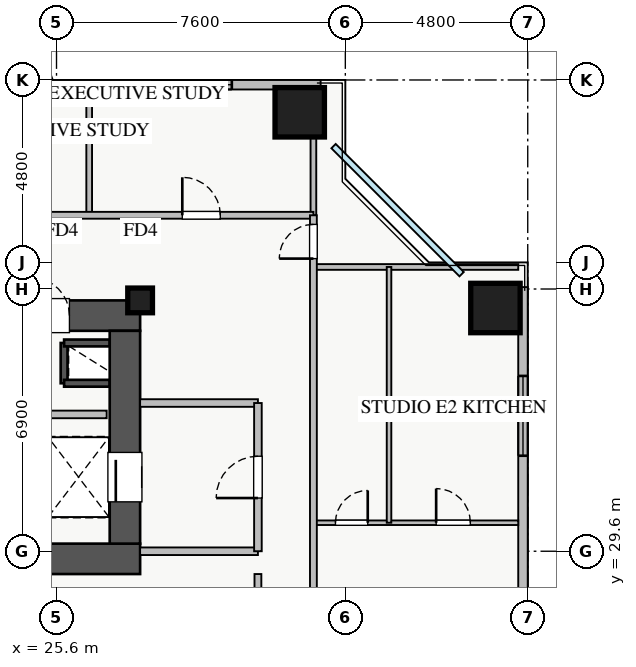
"""IFC4 building model, lengths in metres.
Left out: names, types, materials, properties, quantities, classifications, styles, units other than length and angle.
Written with IfcOpenShell. Run it as: python <this file> out.ifc"""

import sys

from ifc_helpers import new_model, si_unit, direction, frame, frame_2d, origin, origin_2d, place, context, subcontext, project, spatial, rectangle, extrude, source, transform, mapped, element, fill, save


model = new_model("IFC4")
c1 = context("Model", 3, precision=1e-05, world=origin(), true_north=direction((0.0, 1.0)))
c2 = subcontext(c1, "Body", "Model", "MODEL_VIEW")
j1 = project(units=[si_unit("LENGTHUNIT", "METRE"), si_unit("PLANEANGLEUNIT", "RADIAN")], contexts=[c1])
p1 = place(None, origin())
s1 = spatial("IfcSite", under=j1, at=p1, CompositionType="ELEMENT")
p2 = place(p1, origin())
s2 = spatial("IfcBuilding", under=s1, at=p2, CompositionType="ELEMENT")
p3 = place(p2, frame((0.0, 0.0, 66.5)))
s3 = spatial("IfcBuildingStorey", under=s2, at=p3, CompositionType="ELEMENT", Elevation=66.5)
p4 = place(p3, frame((25.8, 34.02, 0.0), z_axis=(0.0, 0.0, 1.0), x_axis=(0.0, 1.0, 0.0)))
e1 = element("IfcWall", 1, at=p4, inside=s3, PredefinedType="SHEAR", context=c2, shape_type="SweptSolid", body=[
    extrude(rectangle(XDim=1.06, YDim=0.18, at=frame_2d((0.53, 0.0))), origin(), (0.0, 0.0, 1.0), 3.07),
])
for number, where, z_axis, x_axis in (
    (2, (25.8, 35.08, 0.0), (0.0, 0.0, 1.0), (1.0, 0.0, 0.0)),
    (3, (25.8, 34.02, 0.0), (0.0, 0.0, 1.0), (1.0, 0.0, 0.0)),
):
    element("IfcWall", number, at=place(p3, frame(where, z_axis=z_axis, x_axis=x_axis)), inside=s3, PredefinedType="SHEAR", context=c2, shape_type="SweptSolid", body=[
        extrude(rectangle(XDim=1.2, YDim=0.18, at=frame_2d((0.6, 0.0))), origin(), (0.0, 0.0, 1.0), 3.07),
    ])
p5 = place(p3, frame((10.2, 29.4, 0.0), z_axis=(0.0, 0.0, 1.0), x_axis=(1.0, 0.0, 0.0)))
e4 = element("IfcWall", 4, at=p5, inside=s3, PredefinedType="SHEAR", context=c2, shape_type="SweptSolid", body=[
    extrude(rectangle(XDim=17.6, YDim=0.8, at=frame_2d((8.8, 0.0))), origin(), (0.0, 0.0, 1.0), 3.25),
])
p6 = place(p3, frame((10.2, 35.8, 0.0), z_axis=(0.0, 0.0, 1.0), x_axis=(1.0, 0.0, 0.0)))
e5 = element("IfcWall", 5, at=p6, inside=s3, PredefinedType="SHEAR", context=c2, shape_type="SweptSolid", body=[
    extrude(rectangle(XDim=17.6, YDim=0.8, at=frame_2d((8.8, 0.0))), origin(), (0.0, 0.0, 1.0), 3.25),
])
p7 = place(p6, frame((1.15, 0.0, 0.0)))
e6 = element("IfcOpeningElement", 6, at=p7, cuts=e5, PredefinedType="OPENING", context=c2, shape_type="SweptSolid", body=[
    extrude(rectangle(XDim=1.1, YDim=2.05, at=frame_2d((0.55, 1.025))), frame((0.0, 0.41, 0.0), z_axis=(0.0, -1.0, 0.0), x_axis=(1.0, 0.0, 0.0)), (0.0, 0.0, 1.0), 0.82),
])
p8 = place(p6, frame((8.3, 0.0, 0.0)))
e7 = element("IfcOpeningElement", 7, at=p8, cuts=e5, PredefinedType="OPENING", context=c2, shape_type="SweptSolid", body=[
    extrude(rectangle(XDim=1.1, YDim=2.05, at=frame_2d((0.55, 1.025))), frame((0.0, 0.41, 0.0), z_axis=(0.0, -1.0, 0.0), x_axis=(1.0, 0.0, 0.0)), (0.0, 0.0, 1.0), 0.82),
])
p9 = place(p6, frame((10.05, 0.0, 0.0)))
e8 = element("IfcOpeningElement", 8, at=p9, cuts=e5, PredefinedType="OPENING", context=c2, shape_type="SweptSolid", body=[
    extrude(rectangle(XDim=1.1, YDim=2.05, at=frame_2d((0.55, 1.025))), frame((0.0, 0.41, 0.0), z_axis=(0.0, -1.0, 0.0), x_axis=(1.0, 0.0, 0.0)), (0.0, 0.0, 1.0), 0.82),
])
p10 = place(p6, frame((14.74, 0.0, 0.0)))
e9 = element("IfcOpeningElement", 9, at=p10, cuts=e5, PredefinedType="OPENING", context=c2, shape_type="SweptSolid", body=[
    extrude(rectangle(XDim=1.0, YDim=2.05, at=frame_2d((0.5, 1.025))), frame((0.0, 0.41, 0.0), z_axis=(0.0, -1.0, 0.0), x_axis=(1.0, 0.0, 0.0)), (0.0, 0.0, 1.0), 0.82),
])
p11 = place(p6, frame((12.585, 0.0, 0.0)))
e10 = element("IfcOpeningElement", 10, at=p11, cuts=e5, PredefinedType="OPENING", context=c2, shape_type="SweptSolid", body=[
    extrude(rectangle(XDim=1.0, YDim=2.05, at=frame_2d((0.5, 1.025))), frame((0.0, 0.41, 0.0), z_axis=(0.0, -1.0, 0.0), x_axis=(1.0, 0.0, 0.0)), (0.0, 0.0, 1.0), 0.82),
])
p12 = place(p3, frame((27.4, 29.8, 0.0), z_axis=(0.0, 0.0, 1.0), x_axis=(0.0, 1.0, 0.0)))
e11 = element("IfcWall", 11, at=p12, inside=s3, PredefinedType="SHEAR", context=c2, shape_type="SweptSolid", body=[
    extrude(rectangle(XDim=5.6, YDim=0.8, at=frame_2d((2.8, 0.0))), origin(), (0.0, 0.0, 1.0), 3.25),
])
p13 = place(p12, frame((1.1, 0.0, 0.0)))
e12 = element("IfcOpeningElement", 12, at=p13, cuts=e11, PredefinedType="OPENING", context=c2, shape_type="SweptSolid", body=[
    extrude(rectangle(XDim=1.3, YDim=2.05, at=frame_2d((0.65, 1.025))), frame((0.0, 0.41, 0.0), z_axis=(0.0, -1.0, 0.0), x_axis=(1.0, 0.0, 0.0)), (0.0, 0.0, 1.0), 0.82),
])
m1 = source(origin(), c2, "Body", "SweptSolid", [
    extrude(rectangle(XDim=0.65, YDim=0.65, at=origin_2d()), origin(), (0.0, 0.0, 1.0), 3.25),
])
p14 = place(p3, frame((27.8, 36.2, 0.0), z_axis=(0.0, 0.0, 1.0), x_axis=(1.0, 0.0, 0.0)))
e13 = element("IfcColumn", 13, at=p14, inside=s3, PredefinedType="PILASTER", context=c2, shape_type="MappedRepresentation", body=[
    mapped(m1, transform((0.0, 0.0, 0.0), x_axis=(1.0, 0.0, 0.0), y_axis=(0.0, 1.0, 0.0), z_axis=(0.0, 0.0, 1.0), scale=1.0)),
])
m2 = source(origin(), c2, "Body", "SweptSolid", [
    extrude(rectangle(XDim=1.3, YDim=1.3, at=origin_2d()), origin(), (0.0, 0.0, 1.0), 3.25),
])
for number, where, z_axis, x_axis in (
    (14, (37.15, 36.0, 0.0), (0.0, 0.0, 1.0), (1.0, 0.0, 0.0)),
    (15, (32.0, 41.15, 0.0), (0.0, 0.0, 1.0), (1.0, 0.0, 0.0)),
):
    element("IfcColumn", number, at=place(p3, frame(where, z_axis=z_axis, x_axis=x_axis)), inside=s3, PredefinedType="COLUMN", context=c2, shape_type="MappedRepresentation", body=[
        mapped(m2, transform((0.0, 0.0, 0.0), x_axis=(1.0, 0.0, 0.0), y_axis=(0.0, 1.0, 0.0), z_axis=(0.0, 0.0, 1.0), scale=1.0)),
    ])
p15 = place(p3, frame((5.45, 41.875, 0.0), z_axis=(0.0, 0.0, 1.0), x_axis=(1.0, 0.0, 0.0)))
e16 = element("IfcWall", 16, at=p15, inside=s3, PredefinedType="STANDARD", context=c2, shape_type="SweptSolid", body=[
    extrude(rectangle(XDim=27.1, YDim=0.25, at=frame_2d((13.55, 0.0))), origin(), (0.0, 0.0, 1.0), 2.61),
])
p16 = place(p15, frame((14.4, 0.0, 0.0)))
e17 = element("IfcOpeningElement", 17, at=p16, cuts=e16, PredefinedType="OPENING", context=c2, shape_type="SweptSolid", body=[
    extrude(rectangle(XDim=1.2, YDim=2.1, at=frame_2d((0.6, 1.05))), frame((0.0, 0.135, 0.0), z_axis=(0.0, -1.0, 0.0), x_axis=(1.0, 0.0, 0.0)), (0.0, 0.0, 1.0), 0.27),
])
p17 = place(p15, frame((1.465, 0.0, 0.9)))
e18 = element("IfcOpeningElement", 18, at=p17, cuts=e16, PredefinedType="OPENING", context=c2, shape_type="SweptSolid", body=[
    extrude(rectangle(XDim=1.5, YDim=1.5, at=frame_2d((0.75, 0.75))), frame((0.0, 0.135, 0.0), z_axis=(0.0, -1.0, 0.0), x_axis=(1.0, 0.0, 0.0)), (0.0, 0.0, 1.0), 0.27),
])
p18 = place(p15, frame((9.263, 0.0, 0.9)))
e19 = element("IfcOpeningElement", 19, at=p18, cuts=e16, PredefinedType="OPENING", context=c2, shape_type="SweptSolid", body=[
    extrude(rectangle(XDim=1.8, YDim=1.45, at=frame_2d((0.9, 0.725))), frame((0.0, 0.135, 0.0), z_axis=(0.0, -1.0, 0.0), x_axis=(1.0, 0.0, 0.0)), (0.0, 0.0, 1.0), 0.27),
])
p19 = place(p15, frame((17.93, 0.0, 0.9)))
e20 = element("IfcOpeningElement", 20, at=p19, cuts=e16, PredefinedType="OPENING", context=c2, shape_type="SweptSolid", body=[
    extrude(rectangle(XDim=1.5, YDim=1.5, at=frame_2d((0.75, 0.75))), frame((0.0, 0.135, 0.0), z_axis=(0.0, -1.0, 0.0), x_axis=(1.0, 0.0, 0.0)), (0.0, 0.0, 1.0), 0.27),
])
p20 = place(p15, frame((22.663, 0.0, 0.9)))
e21 = element("IfcOpeningElement", 21, at=p20, cuts=e16, PredefinedType="OPENING", context=c2, shape_type="SweptSolid", body=[
    extrude(rectangle(XDim=2.1, YDim=1.48, at=frame_2d((1.05, 0.74))), frame((0.0, 0.135, 0.0), z_axis=(0.0, -1.0, 0.0), x_axis=(1.0, 0.0, 0.0)), (0.0, 0.0, 1.0), 0.27),
])
p21 = place(p15, frame((4.63, 0.0, 0.9)))
e22 = element("IfcOpeningElement", 22, at=p21, cuts=e16, PredefinedType="OPENING", context=c2, shape_type="SweptSolid", body=[
    extrude(rectangle(XDim=2.4, YDim=1.5, at=frame_2d((1.2, 0.75))), frame((0.0, 0.135, 0.0), z_axis=(0.0, -1.0, 0.0), x_axis=(1.0, 0.0, 0.0)), (0.0, 0.0, 1.0), 0.27),
])
p22 = place(p3, frame((37.875, 9.45, 0.0), z_axis=(0.0, 0.0, 1.0), x_axis=(0.0, 1.0, 0.0)))
e23 = element("IfcWall", 23, at=p22, inside=s3, PredefinedType="STANDARD", context=c2, shape_type="SweptSolid", body=[
    extrude(rectangle(XDim=27.1, YDim=0.25, at=frame_2d((13.55, 0.0))), origin(), (0.0, 0.0, 1.0), 2.61),
])
p23 = place(p22, frame((14.4, 0.0, 0.0)))
e24 = element("IfcOpeningElement", 24, at=p23, cuts=e23, PredefinedType="OPENING", context=c2, shape_type="SweptSolid", body=[
    extrude(rectangle(XDim=1.2, YDim=2.1, at=frame_2d((0.6, 1.05))), frame((0.0, 0.135, 0.0), z_axis=(0.0, -1.0, 0.0), x_axis=(1.0, 0.0, 0.0)), (0.0, 0.0, 1.0), 0.27),
])
p24 = place(p22, frame((2.188, 0.0, 0.9)))
e25 = element("IfcOpeningElement", 25, at=p24, cuts=e23, PredefinedType="OPENING", context=c2, shape_type="SweptSolid", body=[
    extrude(rectangle(XDim=2.4, YDim=1.48, at=frame_2d((1.2, 0.74))), frame((0.0, 0.135, 0.0), z_axis=(0.0, -1.0, 0.0), x_axis=(1.0, 0.0, 0.0)), (0.0, 0.0, 1.0), 0.27),
])
p25 = place(p22, frame((22.663, 0.0, 0.9)))
e26 = element("IfcOpeningElement", 26, at=p25, cuts=e23, PredefinedType="OPENING", context=c2, shape_type="SweptSolid", body=[
    extrude(rectangle(XDim=2.1, YDim=1.48, at=frame_2d((1.05, 0.74))), frame((0.0, 0.135, 0.0), z_axis=(0.0, -1.0, 0.0), x_axis=(1.0, 0.0, 0.0)), (0.0, 0.0, 1.0), 0.27),
])
p26 = place(p22, frame((13.235, 0.0, 0.9)))
e27 = element("IfcOpeningElement", 27, at=p26, cuts=e23, PredefinedType="OPENING", context=c2, shape_type="SweptSolid", body=[
    extrude(rectangle(XDim=0.9, YDim=1.2, at=frame_2d((0.45, 0.6))), frame((0.0, 0.135, 0.0), z_axis=(0.0, -1.0, 0.0), x_axis=(1.0, 0.0, 0.0)), (0.0, 0.0, 1.0), 0.27),
])
for number, where, z_axis, x_axis in (
    (28, (27.8, 29.6, 0.0), (0.0, 0.0, 1.0), (1.0, 0.0, 0.0)),
    (29, (27.8, 33.5, 0.0), (0.0, 0.0, 1.0), (1.0, 0.0, 0.0)),
):
    element("IfcWall", number, at=place(p3, frame(where, z_axis=z_axis, x_axis=x_axis)), inside=s3, PredefinedType="PARTITIONING", context=c2, shape_type="SweptSolid", body=[
        extrude(rectangle(XDim=3.1, YDim=0.2, at=frame_2d((1.55, 0.0))), origin(), (0.0, 0.0, 1.0), 3.07),
    ])
p27 = place(p3, frame((30.9, 29.6, 0.0), z_axis=(0.0, 0.0, 1.0), x_axis=(0.0, 1.0, 0.0)))
e30 = element("IfcWall", 30, at=p27, inside=s3, PredefinedType="PARTITIONING", context=c2, shape_type="SweptSolid", body=[
    extrude(rectangle(XDim=3.9, YDim=0.2, at=frame_2d((1.95, 0.0))), origin(), (0.0, 0.0, 1.0), 3.07),
])
p28 = place(p27, frame((1.4, 0.0, 0.0)))
e31 = element("IfcOpeningElement", 31, at=p28, cuts=e30, PredefinedType="OPENING", context=c2, shape_type="SweptSolid", body=[
    extrude(rectangle(XDim=1.1, YDim=2.05, at=frame_2d((0.55, 1.025))), frame((0.0, 0.11, 0.0), z_axis=(0.0, -1.0, 0.0), x_axis=(1.0, 0.0, 0.0)), (0.0, 0.0, 1.0), 0.22),
])
p29 = place(p3, frame((21.75, 33.2, 0.0), z_axis=(0.0, 0.0, 1.0), x_axis=(1.0, 0.0, 0.0)))
e32 = element("IfcWall", 32, at=p29, inside=s3, PredefinedType="PARTITIONING", context=c2, shape_type="SweptSolid", body=[
    extrude(rectangle(XDim=5.17, YDim=0.2, at=frame_2d((2.585, 0.0))), origin(), (0.0, 0.0, 1.0), 3.07),
])
for number, where, z_axis, x_axis in (
    (33, (26.46, 38.44, 0.0), (0.0, 0.0, 1.0), (0.0, 1.0, 0.0)),
    (34, (32.36, 38.44, 0.0), (0.0, 0.0, 1.0), (0.0, 1.0, 0.0)),
):
    element("IfcWall", number, at=place(p3, frame(where, z_axis=z_axis, x_axis=x_axis)), inside=s3, PredefinedType="PARTITIONING", context=c2, shape_type="SweptSolid", body=[
        extrude(rectangle(XDim=3.31, YDim=0.15, at=frame_2d((1.655, 0.0))), origin(), (0.0, 0.0, 1.0), 3.07),
    ])
p30 = place(p3, frame((8.75, 38.44, 0.0), z_axis=(0.0, 0.0, 1.0), x_axis=(1.0, 0.0, 0.0)))
e35 = element("IfcWall", 35, at=p30, inside=s3, PredefinedType="PARTITIONING", context=c2, shape_type="SweptSolid", body=[
    extrude(rectangle(XDim=23.61, YDim=0.18, at=frame_2d((11.805, 0.0))), origin(), (0.0, 0.0, 1.0), 3.07),
])
p31 = place(p30, frame((2.03, 0.0, 0.0)))
e36 = element("IfcOpeningElement", 36, at=p31, cuts=e35, PredefinedType="OPENING", context=c2, shape_type="SweptSolid", body=[
    extrude(rectangle(XDim=1.0, YDim=2.05, at=frame_2d((0.5, 1.025))), frame((0.0, 0.1, 0.0), z_axis=(0.0, -1.0, 0.0), x_axis=(1.0, 0.0, 0.0)), (0.0, 0.0, 1.0), 0.2),
])
p32 = place(p30, frame((8.555, 0.0, 0.0)))
e37 = element("IfcOpeningElement", 37, at=p32, cuts=e35, PredefinedType="OPENING", context=c2, shape_type="SweptSolid", body=[
    extrude(rectangle(XDim=1.0, YDim=2.05, at=frame_2d((0.5, 1.025))), frame((0.0, 0.1, 0.0), z_axis=(0.0, -1.0, 0.0), x_axis=(1.0, 0.0, 0.0)), (0.0, 0.0, 1.0), 0.2),
])
p33 = place(p30, frame((14.88, 0.0, 0.0)))
e38 = element("IfcOpeningElement", 38, at=p33, cuts=e35, PredefinedType="OPENING", context=c2, shape_type="SweptSolid", body=[
    extrude(rectangle(XDim=1.0, YDim=2.05, at=frame_2d((0.5, 1.025))), frame((0.0, 0.1, 0.0), z_axis=(0.0, -1.0, 0.0), x_axis=(1.0, 0.0, 0.0)), (0.0, 0.0, 1.0), 0.2),
])
p34 = place(p30, frame((20.16, 0.0, 0.0)))
e39 = element("IfcOpeningElement", 39, at=p34, cuts=e35, PredefinedType="OPENING", context=c2, shape_type="SweptSolid", body=[
    extrude(rectangle(XDim=1.0, YDim=2.05, at=frame_2d((0.5, 1.025))), frame((0.0, 0.1, 0.0), z_axis=(0.0, -1.0, 0.0), x_axis=(1.0, 0.0, 0.0)), (0.0, 0.0, 1.0), 0.2),
])
p35 = place(p3, frame((32.36, 37.08, 0.0), z_axis=(0.0, 0.0, 1.0), x_axis=(1.0, 0.0, 0.0)))
e40 = element("IfcWall", 40, at=p35, inside=s3, PredefinedType="PARTITIONING", context=c2, shape_type="SweptSolid", body=[
    extrude(rectangle(XDim=5.39, YDim=0.15, at=frame_2d((2.695, 0.0))), origin(), (0.0, 0.0, 1.0), 3.07),
])
p36 = place(p3, frame((32.36, 30.35, 0.0), z_axis=(0.0, 0.0, 1.0), x_axis=(1.0, 0.0, 0.0)))
e41 = element("IfcWall", 41, at=p36, inside=s3, PredefinedType="PLUMBINGWALL", context=c2, shape_type="SweptSolid", body=[
    extrude(rectangle(XDim=5.39, YDim=0.12, at=frame_2d((2.695, 0.0))), origin(), (0.0, 0.0, 1.0), 3.07),
])
p37 = place(p36, frame((0.58, 0.0, 0.0)))
e42 = element("IfcOpeningElement", 42, at=p37, cuts=e41, PredefinedType="OPENING", context=c2, shape_type="SweptSolid", body=[
    extrude(rectangle(XDim=0.85, YDim=2.05, at=frame_2d((0.425, 1.025))), frame((0.0, 0.07, 0.0), z_axis=(0.0, -1.0, 0.0), x_axis=(1.0, 0.0, 0.0)), (0.0, 0.0, 1.0), 0.14),
])
p38 = place(p36, frame((3.23, 0.0, 0.0)))
e43 = element("IfcOpeningElement", 43, at=p38, cuts=e41, PredefinedType="OPENING", context=c2, shape_type="SweptSolid", body=[
    extrude(rectangle(XDim=0.9, YDim=2.05, at=frame_2d((0.45, 1.025))), frame((0.0, 0.07, 0.0), z_axis=(0.0, -1.0, 0.0), x_axis=(1.0, 0.0, 0.0)), (0.0, 0.0, 1.0), 0.14),
])
p39 = place(p3, frame((34.35, 30.35, 0.0), z_axis=(0.0, 0.0, 1.0), x_axis=(0.0, 1.0, 0.0)))
e44 = element("IfcWall", 44, at=p39, inside=s3, PredefinedType="PLUMBINGWALL", context=c2, shape_type="SweptSolid", body=[
    extrude(rectangle(XDim=6.73, YDim=0.12, at=frame_2d((3.365, 0.0))), origin(), (0.0, 0.0, 1.0), 3.07),
])
p40 = place(p3, frame((32.36, 7.21, 0.0), z_axis=(0.0, 0.0, 1.0), x_axis=(0.0, 1.0, 0.0)))
e45 = element("IfcWall", 45, at=p40, inside=s3, PredefinedType="PARTITIONING", context=c2, shape_type="SweptSolid", body=[
    extrude(rectangle(XDim=31.23, YDim=0.18, at=frame_2d((15.615, 0.0))), origin(), (0.0, 0.0, 1.0), 2.715),
])
p41 = place(p40, frame((30.09, 0.0, 0.0)))
e46 = element("IfcOpeningElement", 46, at=p41, cuts=e45, PredefinedType="OPENING", context=c2, shape_type="SweptSolid", body=[
    extrude(rectangle(XDim=0.9, YDim=2.05, at=frame_2d((0.45, 1.025))), frame((0.0, 0.1, 0.0), z_axis=(0.0, -1.0, 0.0), x_axis=(1.0, 0.0, 0.0)), (0.0, 0.0, 1.0), 0.2),
])
p42 = place(p40, frame((0.415, 0.0, 0.0)))
e47 = element("IfcOpeningElement", 47, at=p42, cuts=e45, PredefinedType="OPENING", context=c2, shape_type="SweptSolid", body=[
    extrude(rectangle(XDim=0.9, YDim=2.05, at=frame_2d((0.45, 1.025))), frame((0.0, 0.1, 0.0), z_axis=(0.0, -1.0, 0.0), x_axis=(1.0, 0.0, 0.0)), (0.0, 0.0, 1.0), 0.2),
])
p43 = place(p40, frame((7.975, 0.0, 0.0)))
e48 = element("IfcOpeningElement", 48, at=p43, cuts=e45, PredefinedType="OPENING", context=c2, shape_type="SweptSolid", body=[
    extrude(rectangle(XDim=1.0, YDim=2.05, at=frame_2d((0.5, 1.025))), frame((0.0, 0.1, 0.0), z_axis=(0.0, -1.0, 0.0), x_axis=(1.0, 0.0, 0.0)), (0.0, 0.0, 1.0), 0.2),
])
p44 = place(p40, frame((18.5, 0.0, 0.0)))
e49 = element("IfcOpeningElement", 49, at=p44, cuts=e45, PredefinedType="OPENING", context=c2, shape_type="SweptSolid", body=[
    extrude(rectangle(XDim=1.0, YDim=2.05, at=frame_2d((0.5, 1.025))), frame((0.0, 0.1, 0.0), z_axis=(0.0, -1.0, 0.0), x_axis=(1.0, 0.0, 0.0)), (0.0, 0.0, 1.0), 0.2),
])
p45 = place(p3, frame((30.9, 17.0, 0.0), z_axis=(0.0, 0.0, 1.0), x_axis=(0.0, 1.0, 0.0)))
e50 = element("IfcWall", 50, at=p45, inside=s3, PredefinedType="PARTITIONING", context=c2, shape_type="SweptSolid", body=[
    extrude(rectangle(XDim=12.0, YDim=0.18, at=frame_2d((6.0, 0.0))), origin(), (0.0, 0.0, 1.0), 3.07),
])
p46 = place(p45, frame((1.4, 0.0, 0.0)))
e51 = element("IfcOpeningElement", 51, at=p46, cuts=e50, PredefinedType="OPENING", context=c2, shape_type="SweptSolid", body=[
    extrude(rectangle(XDim=1.0, YDim=2.05, at=frame_2d((0.5, 1.025))), frame((0.0, 0.1, 0.0), z_axis=(0.0, -1.0, 0.0), x_axis=(1.0, 0.0, 0.0)), (0.0, 0.0, 1.0), 0.2),
])
p47 = place(p45, frame((5.4, 0.0, 0.0)))
e52 = element("IfcOpeningElement", 52, at=p47, cuts=e50, PredefinedType="OPENING", context=c2, shape_type="SweptSolid", body=[
    extrude(rectangle(XDim=1.0, YDim=2.05, at=frame_2d((0.5, 1.025))), frame((0.0, 0.1, 0.0), z_axis=(0.0, -1.0, 0.0), x_axis=(1.0, 0.0, 0.0)), (0.0, 0.0, 1.0), 0.2),
])
p48 = place(p45, frame((9.4, 0.0, 0.0)))
e53 = element("IfcOpeningElement", 53, at=p48, cuts=e50, PredefinedType="OPENING", context=c2, shape_type="SweptSolid", body=[
    extrude(rectangle(XDim=1.0, YDim=2.05, at=frame_2d((0.5, 1.025))), frame((0.0, 0.1, 0.0), z_axis=(0.0, -1.0, 0.0), x_axis=(1.0, 0.0, 0.0)), (0.0, 0.0, 1.0), 0.2),
])
m3 = source(origin(), c2, "Body", "SweptSolid", [
    extrude(rectangle(XDim=2.1, YDim=1.48, at=frame_2d((1.05, 0.74))), frame((0.0, 0.03, 0.0), z_axis=(0.0, -1.0, 0.0), x_axis=(1.0, 0.0, 0.0)), (0.0, 0.0, 1.0), 0.06),
])
p49 = place(p20, origin())
e54 = element("IfcWindow", 54, at=p49, inside=s3, PartitioningType="TRIPLE_PANEL_VERTICAL", PredefinedType="WINDOW", context=c2, shape_type="MappedRepresentation", body=[
    mapped(m3, transform((0.0, 0.0, 0.0), x_axis=(1.0, 0.0, 0.0), y_axis=(0.0, 1.0, 0.0), z_axis=(0.0, 0.0, 1.0), scale=1.0)),
])
fill(e21, e54)
p50 = place(p25, origin())
e55 = element("IfcWindow", 55, at=p50, inside=s3, PartitioningType="TRIPLE_PANEL_VERTICAL", PredefinedType="WINDOW", context=c2, shape_type="MappedRepresentation", body=[
    mapped(m3, transform((0.0, 0.0, 0.0), x_axis=(1.0, 0.0, 0.0), y_axis=(0.0, 1.0, 0.0), z_axis=(0.0, 0.0, 1.0), scale=1.0)),
])
fill(e26, e55)
m4 = source(origin(), c2, "Body", "SweptSolid", [
    extrude(rectangle(XDim=1.3, YDim=2.05, at=frame_2d((0.65, 1.025))), frame((0.0, 0.025, 0.0), z_axis=(0.0, -1.0, 0.0), x_axis=(1.0, 0.0, 0.0)), (0.0, 0.0, 1.0), 0.05),
])
p51 = place(p13, origin())
e56 = element("IfcDoor", 56, at=p51, inside=s3, OperationType="SLIDING_TO_LEFT", PredefinedType="DOOR", context=c2, shape_type="MappedRepresentation", body=[
    mapped(m4, transform((0.0, 0.0, 0.0), x_axis=(1.0, 0.0, 0.0), y_axis=(0.0, 1.0, 0.0), z_axis=(0.0, 0.0, 1.0), scale=1.0)),
])
fill(e12, e56)
m5 = source(origin(), c2, "Body", "SweptSolid", [
    extrude(rectangle(XDim=1.0, YDim=2.05, at=frame_2d((0.5, 1.025))), frame((0.0, 0.025, 0.0), z_axis=(0.0, -1.0, 0.0), x_axis=(1.0, 0.0, 0.0)), (0.0, 0.0, 1.0), 0.05),
])
p52 = place(p10, origin())
e57 = element("IfcDoor", 57, at=p52, inside=s3, OperationType="SINGLE_SWING_LEFT", PredefinedType="DOOR", context=c2, shape_type="MappedRepresentation", body=[
    mapped(m5, transform((0.0, 0.0, 0.0), x_axis=(1.0, 0.0, 0.0), y_axis=(0.0, 1.0, 0.0), z_axis=(0.0, 0.0, 1.0), scale=1.0)),
])
fill(e9, e57)
m6 = source(origin(), c2, "Body", "SweptSolid", [
    extrude(rectangle(XDim=1.1, YDim=2.05, at=frame_2d((0.55, 1.025))), frame((0.0, 0.025, 0.0), z_axis=(0.0, -1.0, 0.0), x_axis=(1.0, 0.0, 0.0)), (0.0, 0.0, 1.0), 0.05),
])
p53 = place(p28, origin())
e58 = element("IfcDoor", 58, at=p53, inside=s3, OperationType="SINGLE_SWING_LEFT", PredefinedType="DOOR", context=c2, shape_type="MappedRepresentation", body=[
    mapped(m6, transform((0.0, 0.0, 0.0), x_axis=(1.0, 0.0, 0.0), y_axis=(0.0, 1.0, 0.0), z_axis=(0.0, 0.0, 1.0), scale=1.0)),
])
fill(e31, e58)
p54 = place(p34, origin())
e59 = element("IfcDoor", 59, at=p54, inside=s3, OperationType="SINGLE_SWING_LEFT", PredefinedType="DOOR", context=c2, shape_type="MappedRepresentation", body=[
    mapped(m5, transform((0.0, 0.0, 0.0), x_axis=(1.0, 0.0, 0.0), y_axis=(0.0, 1.0, 0.0), z_axis=(0.0, 0.0, 1.0), scale=1.0)),
])
fill(e39, e59)
m7 = source(origin(), c2, "Body", "SweptSolid", [
    extrude(rectangle(XDim=0.85, YDim=2.05, at=frame_2d((0.425, 1.025))), frame((0.0, 0.025, 0.0), z_axis=(0.0, -1.0, 0.0), x_axis=(1.0, 0.0, 0.0)), (0.0, 0.0, 1.0), 0.05),
])
p55 = place(p37, origin())
e60 = element("IfcDoor", 60, at=p55, inside=s3, OperationType="SINGLE_SWING_RIGHT", PredefinedType="DOOR", context=c2, shape_type="MappedRepresentation", body=[
    mapped(m7, transform((0.0, 0.0, 0.0), x_axis=(1.0, 0.0, 0.0), y_axis=(0.0, 1.0, 0.0), z_axis=(0.0, 0.0, 1.0), scale=1.0)),
])
fill(e42, e60)
m8 = source(origin(), c2, "Body", "SweptSolid", [
    extrude(rectangle(XDim=0.9, YDim=2.05, at=frame_2d((0.45, 1.025))), frame((0.0, 0.025, 0.0), z_axis=(0.0, -1.0, 0.0), x_axis=(1.0, 0.0, 0.0)), (0.0, 0.0, 1.0), 0.05),
])
p56 = place(p38, origin())
e61 = element("IfcDoor", 61, at=p56, inside=s3, OperationType="SINGLE_SWING_LEFT", PredefinedType="DOOR", context=c2, shape_type="MappedRepresentation", body=[
    mapped(m8, transform((0.0, 0.0, 0.0), x_axis=(1.0, 0.0, 0.0), y_axis=(0.0, 1.0, 0.0), z_axis=(0.0, 0.0, 1.0), scale=1.0)),
])
fill(e43, e61)
p57 = place(p41, origin())
e62 = element("IfcDoor", 62, at=p57, inside=s3, OperationType="SINGLE_SWING_LEFT", PredefinedType="DOOR", context=c2, shape_type="MappedRepresentation", body=[
    mapped(m8, transform((0.0, 0.0, 0.0), x_axis=(1.0, 0.0, 0.0), y_axis=(0.0, 1.0, 0.0), z_axis=(0.0, 0.0, 1.0), scale=1.0)),
])
fill(e46, e62)
save(model, sys.argv[1])
